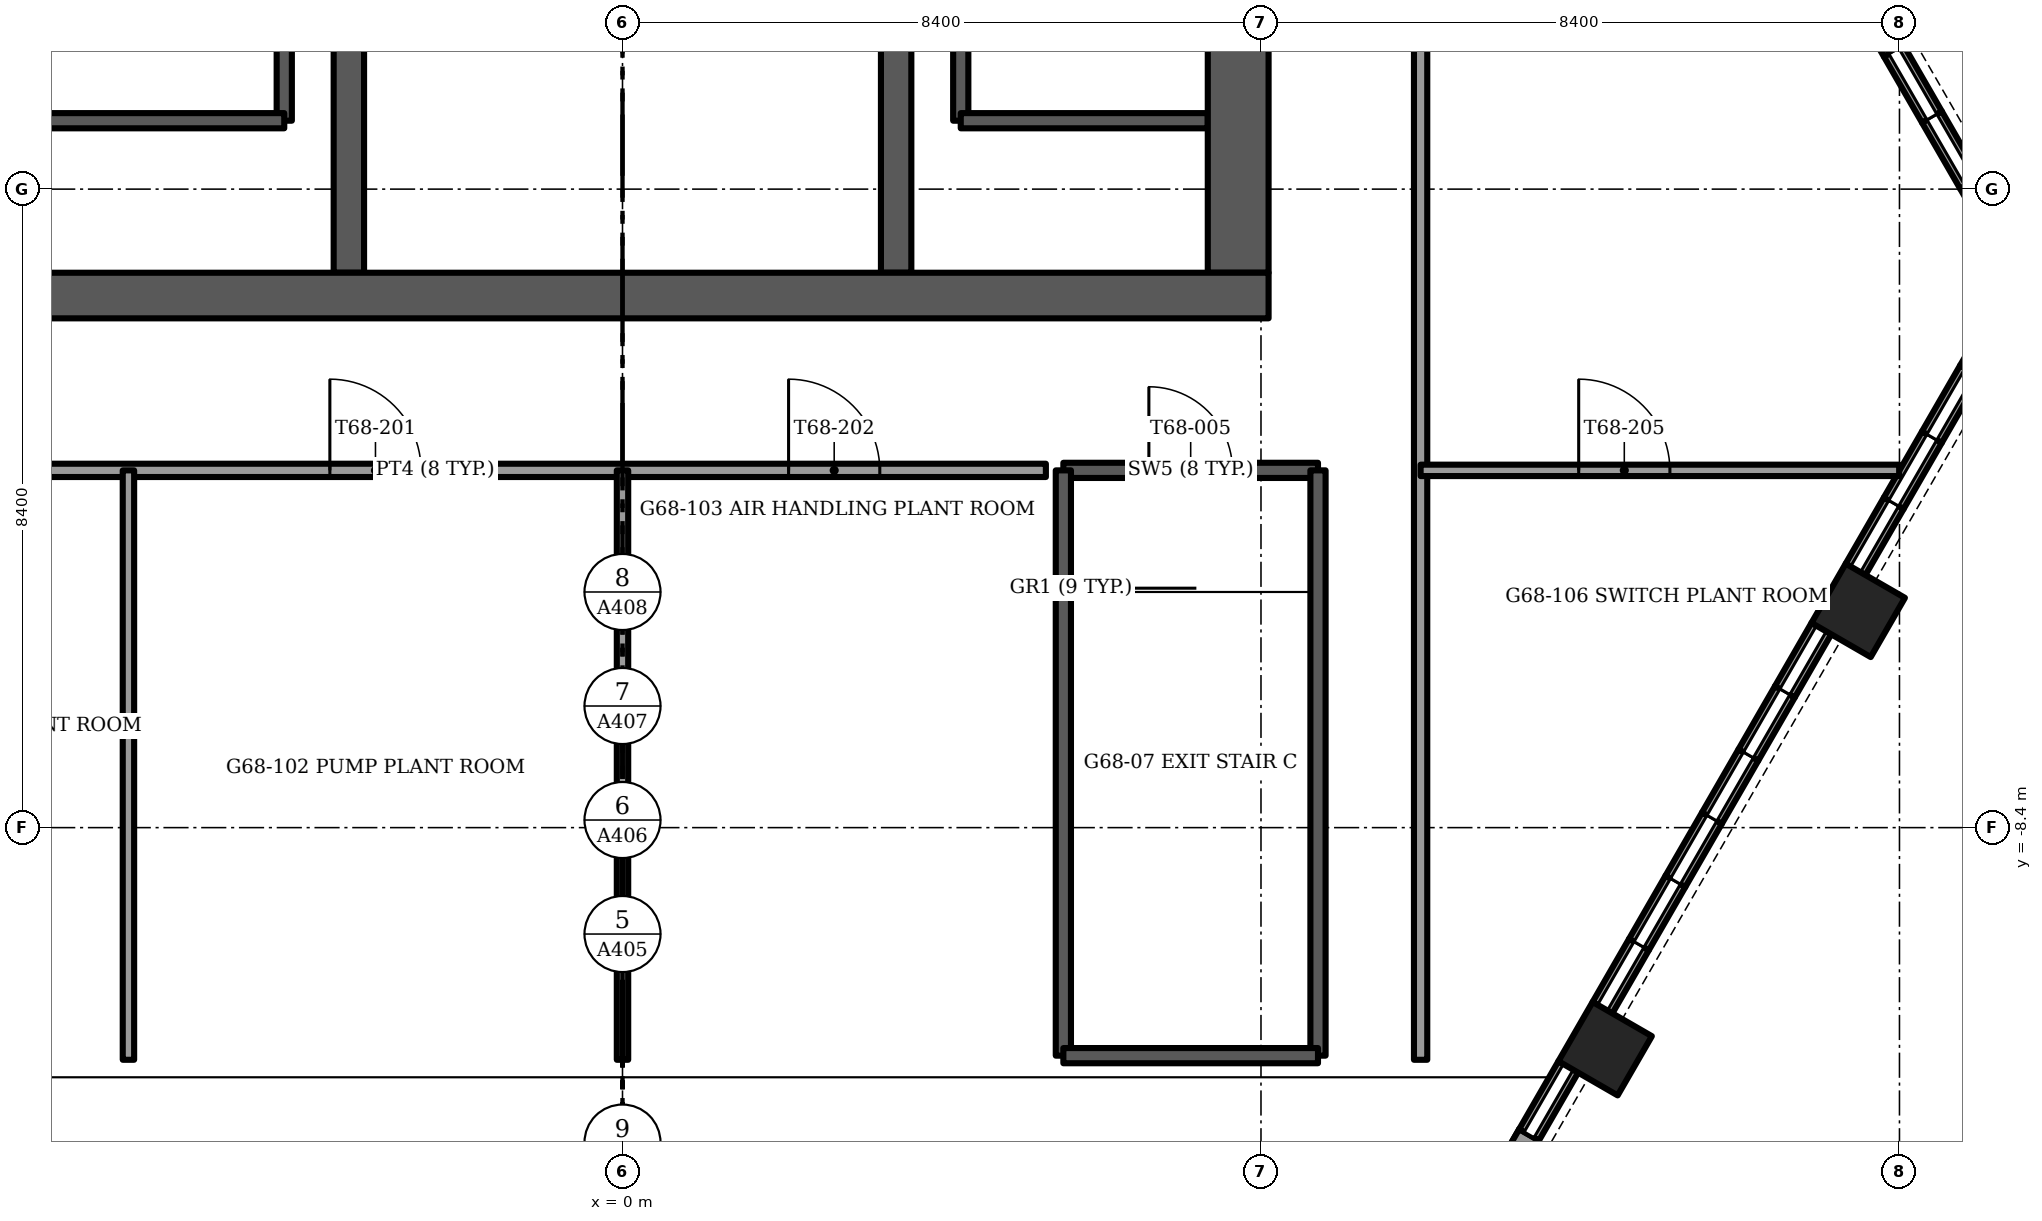
"""IFC4 building model, lengths in metres.
Left out: names, types, materials, properties, quantities, classifications, styles, units other than length and angle.
Written with IfcOpenShell. Run it as: python <this file> out.ifc"""

import sys

from ifc_helpers import new_model, si_unit, direction, frame, frame_2d, origin, origin_2d, place, context, subcontext, project, spatial, rectangle, extrude, element, fill, save


model = new_model("IFC4")
c1 = context("Model", 3, precision=1e-05, world=origin(), true_north=direction((0.0, 1.0)))
c2 = subcontext(c1, "Body", "Model", "MODEL_VIEW")
j1 = project(units=[si_unit("LENGTHUNIT", "METRE"), si_unit("PLANEANGLEUNIT", "RADIAN")], contexts=[c1])
p1 = place(None, origin())
s1 = spatial("IfcSite", under=j1, at=p1, CompositionType="ELEMENT")
p2 = place(p1, origin())
s2 = spatial("IfcBuilding", under=s1, at=p2, CompositionType="ELEMENT")
p3 = place(p2, frame((0.0, 0.0, 275.0)))
s3 = spatial("IfcBuildingStorey", under=s2, at=p3, CompositionType="ELEMENT", Elevation=275.0)
p4 = place(p3, frame((-8.5, -1.4, -0.3), z_axis=(0.0, 0.0, 1.0), x_axis=(1.0, 0.0, 0.0)))
e1 = element("IfcWall", 1, at=p4, inside=s3, PredefinedType="SHEAR", context=c2, shape_type="SweptSolid", body=[
    extrude(rectangle(XDim=17.0, YDim=0.6, at=frame_2d((8.5, 0.0))), origin(), (0.0, 0.0, 1.0), 4.5),
])
p5 = place(p3, frame((8.1, -1.1, -0.3), z_axis=(0.0, 0.0, 1.0), x_axis=(0.0, 1.0, 0.0)))
e2 = element("IfcWall", 2, at=p5, inside=s3, PredefinedType="SHEAR", context=c2, shape_type="SweptSolid", body=[
    extrude(rectangle(XDim=10.2, YDim=0.8, at=frame_2d((5.1, 0.0))), origin(), (0.0, 0.0, 1.0), 4.5),
])
p6 = place(p5, frame((8.35, 0.0, 0.0)))
e3 = element("IfcOpeningElement", 3, at=p6, cuts=e2, PredefinedType="OPENING", context=c2, shape_type="SweptSolid", body=[
    extrude(rectangle(XDim=1.1, YDim=2.1, at=frame_2d((0.55, 1.05))), frame((0.0, 0.4, 0.0), z_axis=(0.0, -1.0, 0.0), x_axis=(1.0, 0.0, 0.0)), (0.0, 0.0, 1.0), 0.8),
])
for number, where, z_axis, x_axis in (
    (4, (-3.6, -1.1, -0.3), (0.0, 0.0, 1.0), (0.0, 1.0, 0.0)),
    (5, (3.6, -1.1, -0.3), (0.0, 0.0, 1.0), (0.0, 1.0, 0.0)),
):
    element("IfcWall", number, at=place(p3, frame(where, z_axis=z_axis, x_axis=x_axis)), inside=s3, PredefinedType="SHEAR", context=c2, shape_type="SweptSolid", body=[
        extrude(rectangle(XDim=10.2, YDim=0.4, at=frame_2d((5.1, 0.0))), origin(), (0.0, 0.0, 1.0), 4.5),
    ])
p7 = place(p3, frame((12.928, -11.308, -1.2), z_axis=(0.0, 0.0, 1.0), x_axis=(-0.5, -0.866025403784, 0.0)))
e6 = element("IfcColumn", 6, at=p7, inside=s3, PredefinedType="COLUMN", context=c2, shape_type="SweptSolid", body=[
    extrude(rectangle(XDim=0.9, YDim=0.9, at=origin_2d()), origin(), (0.0, 0.0, 1.0), 4.341),
])
p8 = place(p3, frame((16.257, -5.542, -1.2), z_axis=(0.0, 0.0, 1.0), x_axis=(-0.5, -0.866025403784, 0.0)))
e7 = element("IfcColumn", 7, at=p8, inside=s3, PredefinedType="COLUMN", context=c2, shape_type="SweptSolid", body=[
    extrude(rectangle(XDim=0.9, YDim=0.9, at=origin_2d()), origin(), (0.0, 0.0, 1.0), 4.5),
])
p9 = place(p3, frame((11.411, -13.335, 0.0), z_axis=(0.0, 0.0, 1.0), x_axis=(0.500084376221, 0.86597668367, 0.0)))
e8 = element("IfcWall", 8, at=p9, inside=s3, PredefinedType="SOLIDWALL", context=c2, shape_type="SweptSolid", body=[
    extrude(rectangle(XDim=1.031, YDim=0.3, at=frame_2d((0.516, 0.0))), origin(), (0.0, 0.0, 1.0), 1.0),
])
p10 = place(p3, frame((11.411, -13.335, 1.0), z_axis=(0.0, 0.0, 1.0), x_axis=(0.500084376221, 0.86597668367, 0.0)))
e9 = element("IfcWall", 9, at=p10, inside=s3, PredefinedType="SOLIDWALL", context=c2, shape_type="SweptSolid", body=[
    extrude(rectangle(XDim=1.031, YDim=0.3, at=frame_2d((0.516, 0.0))), origin(), (0.0, 0.0, 1.0), 0.746),
])
p11 = place(p3, frame((11.927, -12.441, 0.0), z_axis=(0.0, 0.0, 1.0), x_axis=(0.500084376221, 0.86597668367, 0.0)))
e10 = element("IfcWall", 10, at=p11, inside=s3, PredefinedType="SOLIDWALL", context=c2, shape_type="SweptSolid", body=[
    extrude(rectangle(XDim=1.031, YDim=0.3, at=frame_2d((0.516, 0.0))), origin(), (0.0, 0.0, 1.0), 1.0),
])
p12 = place(p3, frame((12.893, -10.769, 0.0), z_axis=(0.0, 0.0, 1.0), x_axis=(0.499942693199, 0.866058487353, 0.0)))
e11 = element("IfcWall", 11, at=p12, inside=s3, PredefinedType="SOLIDWALL", context=c2, shape_type="SweptSolid", body=[
    extrude(rectangle(XDim=0.959, YDim=0.3, at=frame_2d((0.48, 0.0))), origin(), (0.0, 0.0, 1.0), 1.0),
])
for number, where, z_axis, x_axis in (
    (12, (13.373, -9.938, 0.0), (0.0, 0.0, 1.0), (0.5, 0.866, 0.0)),
    (13, (13.853, -9.106, 0.0), (0.0, 0.0, 1.0), (0.5, 0.866, 0.0)),
):
    element("IfcWall", number, at=place(p3, frame(where, z_axis=z_axis, x_axis=x_axis)), inside=s3, PredefinedType="SOLIDWALL", context=c2, shape_type="SweptSolid", body=[
        extrude(rectangle(XDim=0.96, YDim=0.3, at=frame_2d((0.48, 0.0))), origin(), (0.0, 0.0, 1.0), 1.0),
    ])
p13 = place(p3, frame((14.333, -8.275, 0.0), z_axis=(0.0, 0.0, 1.0), x_axis=(0.499942693199, 0.866058487353, 0.0)))
e14 = element("IfcWall", 14, at=p13, inside=s3, PredefinedType="SOLIDWALL", context=c2, shape_type="SweptSolid", body=[
    extrude(rectangle(XDim=0.959, YDim=0.3, at=frame_2d((0.48, 0.0))), origin(), (0.0, 0.0, 1.0), 1.0),
])
p14 = place(p3, frame((14.812, -7.444, 0.0), z_axis=(0.0, 0.0, 1.0), x_axis=(0.500023335103, 0.866011930837, 0.0)))
e15 = element("IfcWall", 15, at=p14, inside=s3, PredefinedType="SOLIDWALL", context=c2, shape_type="SweptSolid", body=[
    extrude(rectangle(XDim=0.96, YDim=0.3, at=frame_2d((0.48, 0.0))), origin(), (0.0, 0.0, 1.0), 1.0),
])
p15 = place(p3, frame((15.292, -6.613, 0.0), z_axis=(0.0, 0.0, 1.0), x_axis=(0.500133489192, 0.865948320045, 0.0)))
e16 = element("IfcWall", 16, at=p15, inside=s3, PredefinedType="SOLIDWALL", context=c2, shape_type="SweptSolid", body=[
    extrude(rectangle(XDim=0.96, YDim=0.3, at=frame_2d((0.48, 0.0))), origin(), (0.0, 0.0, 1.0), 1.0),
])
p16 = place(p3, frame((16.222, -5.002, 0.0), z_axis=(0.0, 0.0, 1.0), x_axis=(0.500115484592, 0.865958718457, 0.0)))
e17 = element("IfcWall", 17, at=p16, inside=s3, PredefinedType="SOLIDWALL", context=c2, shape_type="SweptSolid", body=[
    extrude(rectangle(XDim=1.004, YDim=0.3, at=frame_2d((0.502, 0.0))), origin(), (0.0, 0.0, 1.0), 1.0),
])
p17 = place(p3, frame((16.724, -4.133, 0.0), z_axis=(0.0, 0.0, 1.0), x_axis=(0.499904868165, 0.866080321209, 0.0)))
e18 = element("IfcWall", 18, at=p17, inside=s3, PredefinedType="SOLIDWALL", context=c2, shape_type="SweptSolid", body=[
    extrude(rectangle(XDim=1.004, YDim=0.3, at=frame_2d((0.502, 0.0))), origin(), (0.0, 0.0, 1.0), 1.0),
])
p18 = place(p3, frame((17.226, -3.263, 0.0), z_axis=(0.0, 0.0, 1.0), x_axis=(0.499933044277, 0.866064057238, 0.0)))
e19 = element("IfcWall", 19, at=p18, inside=s3, PredefinedType="SOLIDWALL", context=c2, shape_type="SweptSolid", body=[
    extrude(rectangle(XDim=1.004, YDim=0.3, at=frame_2d((0.502, 0.0))), origin(), (0.0, 0.0, 1.0), 1.0),
])
p19 = place(p3, frame((17.728, -2.394, 0.0), z_axis=(0.0, 0.0, 1.0), x_axis=(0.500010157896, 0.866019539041, 0.0)))
e20 = element("IfcWall", 20, at=p19, inside=s3, PredefinedType="SOLIDWALL", context=c2, shape_type="SweptSolid", body=[
    extrude(rectangle(XDim=1.004, YDim=0.3, at=frame_2d((0.502, 0.0))), origin(), (0.0, 0.0, 1.0), 1.0),
])
for number, where, z_axis, x_axis in (
    (21, (18.23, -0.788, 0.0), (0.0, 0.0, 1.0), (-0.5, 0.866, 0.0)),
    (22, (17.729, 0.08, 0.0), (0.0, 0.0, 1.0), (-0.5, 0.866, 0.0)),
    (23, (17.227, 0.949, 0.0), (0.0, 0.0, 1.0), (-0.5, 0.866, 0.0)),
    (24, (16.726, 1.818, 0.0), (0.0, 0.0, 1.0), (-0.5, 0.866, 0.0)),
):
    element("IfcWall", number, at=place(p3, frame(where, z_axis=z_axis, x_axis=x_axis)), inside=s3, PredefinedType="SOLIDWALL", context=c2, shape_type="SweptSolid", body=[
        extrude(rectangle(XDim=1.003, YDim=0.3, at=frame_2d((0.501, 0.0))), origin(), (0.0, 0.0, 1.0), 1.0),
    ])
p20 = place(p3, frame((-10.5, -3.7, 0.0), z_axis=(0.0, 0.0, 1.0), x_axis=(1.0, 0.0, 0.0)))
e25 = element("IfcWall", 25, at=p20, inside=s3, PredefinedType="PARTITIONING", context=c2, shape_type="SweptSolid", body=[
    extrude(rectangle(XDim=16.07, YDim=0.175, at=frame_2d((8.035, 0.0))), origin(), (0.0, 0.0, 1.0), 4.2),
])
p21 = place(p20, frame((1.4, 0.0, 0.0)))
e26 = element("IfcOpeningElement", 26, at=p21, cuts=e25, PredefinedType="OPENING", context=c2, shape_type="SweptSolid", body=[
    extrude(rectangle(XDim=1.2, YDim=2.1, at=frame_2d((0.6, 1.05))), frame((0.0, 0.087, 0.0), z_axis=(0.0, -1.0, 0.0), x_axis=(1.0, 0.0, 0.0)), (0.0, 0.0, 1.0), 0.175),
])
p22 = place(p20, frame((6.65, 0.0, 0.0)))
e27 = element("IfcOpeningElement", 27, at=p22, cuts=e25, PredefinedType="OPENING", context=c2, shape_type="SweptSolid", body=[
    extrude(rectangle(XDim=1.2, YDim=2.1, at=frame_2d((0.6, 1.05))), frame((0.0, 0.087, 0.0), z_axis=(0.0, -1.0, 0.0), x_axis=(1.0, 0.0, 0.0)), (0.0, 0.0, 1.0), 0.175),
])
p23 = place(p20, frame((12.685, 0.0, 0.0)))
e28 = element("IfcOpeningElement", 28, at=p23, cuts=e25, PredefinedType="OPENING", context=c2, shape_type="SweptSolid", body=[
    extrude(rectangle(XDim=1.2, YDim=2.1, at=frame_2d((0.6, 1.05))), frame((0.0, 0.087, 0.0), z_axis=(0.0, -1.0, 0.0), x_axis=(1.0, 0.0, 0.0)), (0.0, 0.0, 1.0), 0.175),
])
p24 = place(p3, frame((10.5, -11.454, 0.0), z_axis=(0.0, 0.0, 1.0), x_axis=(0.0, 1.0, 0.0)))
e29 = element("IfcWall", 29, at=p24, inside=s3, PredefinedType="PARTITIONING", context=c2, shape_type="SweptSolid", body=[
    extrude(rectangle(XDim=21.154, YDim=0.175, at=frame_2d((10.577, 0.0))), origin(), (0.0, 0.0, 1.0), 4.067),
])
p25 = place(p24, frame((13.854, 0.0, 0.0)))
e30 = element("IfcOpeningElement", 30, at=p25, cuts=e29, PredefinedType="OPENING", context=c2, shape_type="SweptSolid", body=[
    extrude(rectangle(XDim=1.2, YDim=2.1, at=frame_2d((0.6, 1.05))), frame((0.0, 0.087, 0.0), z_axis=(0.0, -1.0, 0.0), x_axis=(1.0, 0.0, 0.0)), (0.0, 0.0, 1.0), 0.175),
])
p26 = place(p3, frame((10.5, -3.7, 0.0), z_axis=(0.0, 0.0, 1.0), x_axis=(1.0, 0.0, 0.0)))
e31 = element("IfcWall", 31, at=p26, inside=s3, PredefinedType="PARTITIONING", context=c2, shape_type="SweptSolid", body=[
    extrude(rectangle(XDim=6.296, YDim=0.15, at=frame_2d((3.148, 0.0))), origin(), (0.0, 0.0, 1.0), 4.2),
])
p27 = place(p26, frame((2.08, 0.0, 0.0)))
e32 = element("IfcOpeningElement", 32, at=p27, cuts=e31, PredefinedType="OPENING", context=c2, shape_type="SweptSolid", body=[
    extrude(rectangle(XDim=1.2, YDim=2.1, at=frame_2d((0.6, 1.05))), frame((0.0, 0.075, 0.0), z_axis=(0.0, -1.0, 0.0), x_axis=(1.0, 0.0, 0.0)), (0.0, 0.0, 1.0), 0.15),
])
for number, where, z_axis, x_axis in (
    (33, (-6.5, -11.454, 0.0), (0.0, 0.0, 1.0), (0.0, 1.0, 0.0)),
    (34, (0.0, -11.454, 0.0), (0.0, 0.0, 1.0), (0.0, 1.0, 0.0)),
):
    element("IfcWall", number, at=place(p3, frame(where, z_axis=z_axis, x_axis=x_axis)), inside=s3, PredefinedType="PARTITIONING", context=c2, shape_type="SweptSolid", body=[
        extrude(rectangle(XDim=7.754, YDim=0.15, at=frame_2d((3.877, 0.0))), origin(), (0.0, 0.0, 1.0), 4.067),
    ])
p28 = place(p3, frame((-4.45, 0.9, -0.3), z_axis=(0.0, 0.0, 1.0), x_axis=(0.0, 1.0, 0.0)))
e35 = element("IfcWall", 35, at=p28, inside=s3, PredefinedType="SOLIDWALL", context=c2, shape_type="SweptSolid", body=[
    extrude(rectangle(XDim=8.2, YDim=0.2, at=frame_2d((4.1, 0.0))), origin(), (0.0, 0.0, 1.0), 4.5),
])
p29 = place(p3, frame((-7.7, 0.9, -0.3), z_axis=(0.0, 0.0, 1.0), x_axis=(1.0, 0.0, 0.0)))
e36 = element("IfcWall", 36, at=p29, inside=s3, PredefinedType="SOLIDWALL", context=c2, shape_type="SweptSolid", body=[
    extrude(rectangle(XDim=3.25, YDim=0.2, at=frame_2d((1.625, 0.0))), origin(), (0.0, 0.0, 1.0), 4.5),
])
p30 = place(p3, frame((4.45, 0.9, -0.3), z_axis=(0.0, 0.0, 1.0), x_axis=(0.0, 1.0, 0.0)))
e37 = element("IfcWall", 37, at=p30, inside=s3, PredefinedType="SOLIDWALL", context=c2, shape_type="SweptSolid", body=[
    extrude(rectangle(XDim=8.2, YDim=0.2, at=frame_2d((4.1, 0.0))), origin(), (0.0, 0.0, 1.0), 4.5),
])
p31 = place(p3, frame((4.45, 0.9, -0.3), z_axis=(0.0, 0.0, 1.0), x_axis=(1.0, 0.0, 0.0)))
e38 = element("IfcWall", 38, at=p31, inside=s3, PredefinedType="SOLIDWALL", context=c2, shape_type="SweptSolid", body=[
    extrude(rectangle(XDim=3.25, YDim=0.2, at=frame_2d((1.625, 0.0))), origin(), (0.0, 0.0, 1.0), 4.5),
])
p32 = place(p3, frame((5.8, -3.7, -0.3), z_axis=(0.0, 0.0, 1.0), x_axis=(1.0, 0.0, 0.0)))
e39 = element("IfcWall", 39, at=p32, inside=s3, PredefinedType="SOLIDWALL", context=c2, shape_type="SweptSolid", body=[
    extrude(rectangle(XDim=3.35, YDim=0.2, at=frame_2d((1.675, 0.0))), origin(), (0.0, 0.0, 1.0), 4.5),
])
p33 = place(p32, frame((1.125, 0.0, 0.0)))
e40 = element("IfcOpeningElement", 40, at=p33, cuts=e39, PredefinedType="OPENING", context=c2, shape_type="SweptSolid", body=[
    extrude(rectangle(XDim=1.1, YDim=2.1, at=frame_2d((0.55, 1.05))), frame((0.0, 0.1, 0.0), z_axis=(0.0, -1.0, 0.0), x_axis=(1.0, 0.0, 0.0)), (0.0, 0.0, 1.0), 0.2),
])
for number, where, z_axis, x_axis in (
    (41, (5.8, -3.7, -0.3), (0.0, 0.0, 1.0), (0.0, -1.0, 0.0)),
    (42, (9.15, -3.7, -0.3), (0.0, 0.0, 1.0), (0.0, -1.0, 0.0)),
):
    element("IfcWall", number, at=place(p3, frame(where, z_axis=z_axis, x_axis=x_axis)), inside=s3, PredefinedType="SOLIDWALL", context=c2, shape_type="SweptSolid", body=[
        extrude(rectangle(XDim=7.7, YDim=0.2, at=frame_2d((3.85, 0.0))), origin(), (0.0, 0.0, 1.0), 4.5),
    ])
p34 = place(p3, frame((5.8, -11.4, -0.3), z_axis=(0.0, 0.0, 1.0), x_axis=(1.0, 0.0, 0.0)))
e43 = element("IfcWall", 43, at=p34, inside=s3, PredefinedType="SOLIDWALL", context=c2, shape_type="SweptSolid", body=[
    extrude(rectangle(XDim=3.35, YDim=0.2, at=frame_2d((1.675, 0.0))), origin(), (0.0, 0.0, 1.0), 4.5),
])
p35 = place(p22, origin())
e44 = element("IfcDoor", 44, at=p35, inside=s3, OperationType="SINGLE_SWING_LEFT", PredefinedType="DOOR", context=c2, shape_type="SweptSolid", body=[
    extrude(rectangle(XDim=1.2, YDim=2.1, at=frame_2d((0.6, 1.05))), frame((0.0, 0.025, 0.0), z_axis=(0.0, -1.0, 0.0), x_axis=(1.0, 0.0, 0.0)), (0.0, 0.0, 1.0), 0.05),
])
fill(e27, e44)
p36 = place(p23, origin())
e45 = element("IfcDoor", 45, at=p36, inside=s3, OperationType="SINGLE_SWING_RIGHT", PredefinedType="DOOR", context=c2, shape_type="SweptSolid", body=[
    extrude(rectangle(XDim=1.2, YDim=2.1, at=frame_2d((0.6, 1.05))), frame((0.0, 0.025, 0.0), z_axis=(0.0, -1.0, 0.0), x_axis=(1.0, 0.0, 0.0)), (0.0, 0.0, 1.0), 0.05),
])
fill(e28, e45)
p37 = place(p27, origin())
e46 = element("IfcDoor", 46, at=p37, inside=s3, OperationType="SINGLE_SWING_LEFT", PredefinedType="DOOR", context=c2, shape_type="SweptSolid", body=[
    extrude(rectangle(XDim=1.2, YDim=2.1, at=frame_2d((0.6, 1.05))), frame((0.0, 0.025, 0.0), z_axis=(0.0, -1.0, 0.0), x_axis=(1.0, 0.0, 0.0)), (0.0, 0.0, 1.0), 0.05),
])
fill(e32, e46)
p38 = place(p33, origin())
e47 = element("IfcDoor", 47, at=p38, inside=s3, OperationType="SINGLE_SWING_LEFT", PredefinedType="DOOR", context=c2, shape_type="SweptSolid", body=[
    extrude(rectangle(XDim=1.1, YDim=2.1, at=frame_2d((0.55, 1.05))), frame((0.0, 0.025, 0.0), z_axis=(0.0, -1.0, 0.0), x_axis=(1.0, 0.0, 0.0)), (0.0, 0.0, 1.0), 0.05),
])
fill(e40, e47)
save(model, sys.argv[1])
